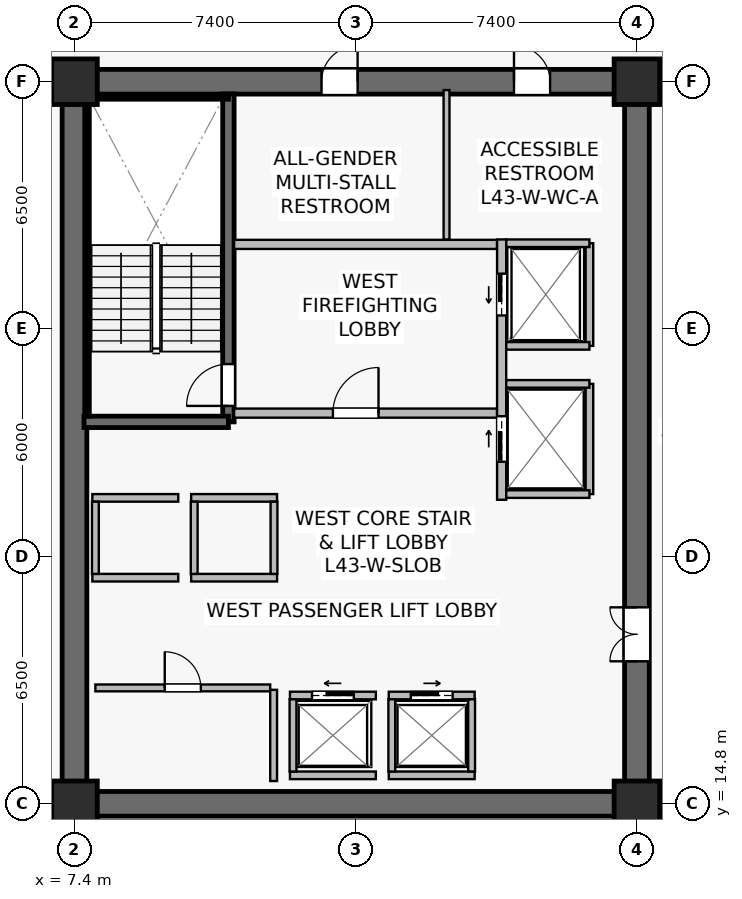
"""IFC4 building model, lengths in metres.
Left out: names, types, materials, properties, quantities, classifications, styles, units other than length and angle.
Written with IfcOpenShell. Run it as: python <this file> out.ifc"""

import sys

from ifc_helpers import new_model, si_unit, direction, frame, frame_2d, origin, origin_2d, place, context, subcontext, project, spatial, rectangle, extrude, source, transform, mapped, element, fill, save


model = new_model("IFC4")
c1 = context("Model", 3, precision=1e-05, world=origin(), true_north=direction((0.0, 1.0)))
c2 = subcontext(c1, "Body", "Model", "MODEL_VIEW")
j1 = project(units=[si_unit("LENGTHUNIT", "METRE"), si_unit("PLANEANGLEUNIT", "RADIAN")], contexts=[c1])
p1 = place(None, origin())
s1 = spatial("IfcSite", under=j1, at=p1, CompositionType="ELEMENT")
p2 = place(p1, origin())
s2 = spatial("IfcBuilding", under=s1, at=p2, CompositionType="ELEMENT")
p3 = place(p2, frame((0.0, 0.0, 178.9)))
s3 = spatial("IfcBuildingStorey", under=s2, at=p3, CompositionType="ELEMENT", Elevation=178.9)
p4 = place(p3, frame((7.075, 14.8, 0.0), z_axis=(0.0, 0.0, 1.0), x_axis=(1.0, 0.0, 0.0)))
e1 = element("IfcWall", 1, at=p4, inside=s3, PredefinedType="SHEAR", context=c2, shape_type="SweptSolid", body=[
    extrude(rectangle(XDim=15.45, YDim=0.65, at=frame_2d((7.725, 0.0))), origin(), (0.0, 0.0, 1.0), 3.79),
])
p5 = place(p3, frame((7.075, 33.8, 0.0), z_axis=(0.0, 0.0, 1.0), x_axis=(1.0, 0.0, 0.0)))
e2 = element("IfcWall", 2, at=p5, inside=s3, PredefinedType="SHEAR", context=c2, shape_type="SweptSolid", body=[
    extrude(rectangle(XDim=15.45, YDim=0.65, at=frame_2d((7.725, 0.0))), origin(), (0.0, 0.0, 1.0), 3.79),
])
p6 = place(p5, frame((6.825, 0.0, 0.0)))
e3 = element("IfcOpeningElement", 3, at=p6, cuts=e2, PredefinedType="OPENING", context=c2, shape_type="SweptSolid", body=[
    extrude(rectangle(XDim=0.95, YDim=2.15, at=frame_2d((0.475, 1.075))), frame((0.0, 0.335, 0.0), z_axis=(0.0, -1.0, 0.0), x_axis=(1.0, 0.0, 0.0)), (0.0, 0.0, 1.0), 0.67),
])
p7 = place(p5, frame((11.89, 0.0, 0.0)))
e4 = element("IfcOpeningElement", 4, at=p7, cuts=e2, PredefinedType="OPENING", context=c2, shape_type="SweptSolid", body=[
    extrude(rectangle(XDim=0.95, YDim=2.15, at=frame_2d((0.475, 1.075))), frame((0.0, 0.335, 0.0), z_axis=(0.0, -1.0, 0.0), x_axis=(1.0, 0.0, 0.0)), (0.0, 0.0, 1.0), 0.67),
])
p8 = place(p3, frame((7.4, 15.125, 0.0), z_axis=(0.0, 0.0, 1.0), x_axis=(0.0, 1.0, 0.0)))
e5 = element("IfcWall", 5, at=p8, inside=s3, PredefinedType="SHEAR", context=c2, shape_type="SweptSolid", body=[
    extrude(rectangle(XDim=18.35, YDim=0.65, at=frame_2d((9.175, 0.0))), origin(), (0.0, 0.0, 1.0), 3.79),
])
p9 = place(p3, frame((22.2, 15.125, 0.0), z_axis=(0.0, 0.0, 1.0), x_axis=(0.0, 1.0, 0.0)))
e6 = element("IfcWall", 6, at=p9, inside=s3, PredefinedType="SHEAR", context=c2, shape_type="SweptSolid", body=[
    extrude(rectangle(XDim=18.35, YDim=0.65, at=frame_2d((9.175, 0.0))), origin(), (0.0, 0.0, 1.0), 3.79),
])
p10 = place(p9, frame((3.425, 0.0, 0.0)))
e7 = element("IfcOpeningElement", 7, at=p10, cuts=e6, PredefinedType="OPENING", context=c2, shape_type="SweptSolid", body=[
    extrude(rectangle(XDim=1.42, YDim=2.2, at=frame_2d((0.71, 1.1))), frame((0.0, 0.335, 0.0), z_axis=(0.0, -1.0, 0.0), x_axis=(1.0, 0.0, 0.0)), (0.0, 0.0, 1.0), 0.67),
])
p11 = place(p3, frame((11.45, 24.85, 0.0), z_axis=(0.0, 0.0, 1.0), x_axis=(0.0, 1.0, 0.0)))
e8 = element("IfcWall", 8, at=p11, inside=s3, PredefinedType="SHEAR", context=c2, shape_type="SweptSolid", body=[
    extrude(rectangle(XDim=8.63, YDim=0.3, at=frame_2d((4.315, 0.0))), origin(), (0.0, 0.0, 1.0), 3.79),
])
p12 = place(p11, frame((0.42, 0.0, 0.0)))
e9 = element("IfcOpeningElement", 9, at=p12, cuts=e8, PredefinedType="OPENING", context=c2, shape_type="SweptSolid", body=[
    extrude(rectangle(XDim=1.1, YDim=2.15, at=frame_2d((0.55, 1.075))), frame((0.0, 0.16, 0.0), z_axis=(0.0, -1.0, 0.0), x_axis=(1.0, 0.0, 0.0)), (0.0, 0.0, 1.0), 0.32),
])
p13 = place(p3, frame((7.65, 24.85, 0.0), z_axis=(0.0, 0.0, 1.0), x_axis=(1.0, 0.0, 0.0)))
e10 = element("IfcWall", 10, at=p13, inside=s3, PredefinedType="SHEAR", context=c2, shape_type="SweptSolid", body=[
    extrude(rectangle(XDim=3.8, YDim=0.3, at=frame_2d((1.9, 0.0))), origin(), (0.0, 0.0, 1.0), 3.79),
])
p14 = place(p3, frame((7.73, 33.4, 0.0), z_axis=(0.0, 0.0, 1.0), x_axis=(1.0, 0.0, 0.0)))
e11 = element("IfcWall", 11, at=p14, inside=s3, PredefinedType="SOLIDWALL", context=c2, shape_type="SweptSolid", body=[
    extrude(rectangle(XDim=3.72, YDim=0.12, at=frame_2d((1.86, 0.0))), origin(), (0.0, 0.0, 1.0), 3.79),
])
p15 = place(p3, frame((7.73, 25.0, 0.0), z_axis=(0.0, 0.0, 1.0), x_axis=(0.0, 1.0, 0.0)))
e12 = element("IfcWall", 12, at=p15, inside=s3, PredefinedType="SOLIDWALL", context=c2, shape_type="SweptSolid", body=[
    extrude(rectangle(XDim=8.32, YDim=0.12, at=frame_2d((4.16, 0.0))), origin(), (0.0, 0.0, 1.0), 3.79),
])
m1 = source(origin(), c2, "Body", "SweptSolid", [
    extrude(rectangle(XDim=1.2, YDim=1.2, at=origin_2d()), origin(), (0.0, 0.0, 1.0), 4.1),
])
for number, where, z_axis, x_axis in (
    (13, (7.4, 14.8, 0.0), (0.0, 0.0, 1.0), (1.0, 0.0, 0.0)),
    (14, (22.2, 14.8, 0.0), (0.0, 0.0, 1.0), (1.0, 0.0, 0.0)),
    (15, (7.4, 33.8, 0.0), (0.0, 0.0, 1.0), (1.0, 0.0, 0.0)),
    (16, (22.2, 33.8, 0.0), (0.0, 0.0, 1.0), (1.0, 0.0, 0.0)),
):
    element("IfcColumn", number, at=place(p3, frame(where, z_axis=z_axis, x_axis=x_axis)), inside=s3, PredefinedType="COLUMN", context=c2, shape_type="MappedRepresentation", body=[
        mapped(m1, transform((0.0, 0.0, 0.0), scale=1.0)),
    ])
p16 = place(p3, frame((11.6, 25.08, 0.0), z_axis=(0.0, 0.0, 1.0), x_axis=(1.0, 0.0, 0.0)))
e17 = element("IfcWall", 17, at=p16, inside=s3, PredefinedType="SOLIDWALL", context=c2, shape_type="SweptSolid", body=[
    extrude(rectangle(XDim=6.92, YDim=0.24, at=frame_2d((3.46, 0.0))), origin(), (0.0, 0.0, 1.0), 3.187),
])
p17 = place(p16, frame((2.6, 0.0, 0.0)))
e18 = element("IfcOpeningElement", 18, at=p17, cuts=e17, PredefinedType="OPENING", context=c2, shape_type="SweptSolid", body=[
    extrude(rectangle(XDim=1.2, YDim=2.16, at=frame_2d((0.6, 1.08))), frame((0.0, 0.13, 0.0), z_axis=(0.0, -1.0, 0.0), x_axis=(1.0, 0.0, 0.0)), (0.0, 0.0, 1.0), 0.26),
])
p18 = place(p3, frame((11.6, 29.52, 0.0), z_axis=(0.0, 0.0, 1.0), x_axis=(1.0, 0.0, 0.0)))
e19 = element("IfcWall", 19, at=p18, inside=s3, PredefinedType="SOLIDWALL", context=c2, shape_type="SweptSolid", body=[
    extrude(rectangle(XDim=6.92, YDim=0.24, at=frame_2d((3.46, 0.0))), origin(), (0.0, 0.0, 1.0), 3.187),
])
p19 = place(p3, frame((18.64, 22.8, 0.0), z_axis=(0.0, 0.0, 1.0), x_axis=(0.0, 1.0, 0.0)))
e20 = element("IfcWall", 20, at=p19, inside=s3, PredefinedType="SOLIDWALL", context=c2, shape_type="SweptSolid", body=[
    extrude(rectangle(XDim=6.85, YDim=0.24, at=frame_2d((3.425, 0.0))), origin(), (0.0, 0.0, 1.0), 2.925),
])
p20 = place(p19, frame((4.85, 0.0, 0.0)))
e21 = element("IfcOpeningElement", 21, at=p20, cuts=e20, PredefinedType="OPENING", context=c2, shape_type="SweptSolid", body=[
    extrude(rectangle(XDim=1.1, YDim=2.22, at=frame_2d((0.55, 1.11))), frame((0.0, 0.13, 0.0), z_axis=(0.0, -1.0, 0.0), x_axis=(1.0, 0.0, 0.0)), (0.0, 0.0, 1.0), 0.26),
])
p21 = place(p19, frame((1.0, 0.0, 0.0)))
e22 = element("IfcOpeningElement", 22, at=p21, cuts=e20, PredefinedType="OPENING", context=c2, shape_type="SweptSolid", body=[
    extrude(rectangle(XDim=1.2, YDim=2.22, at=frame_2d((0.6, 1.11))), frame((0.0, 0.13, 0.0), z_axis=(0.0, -1.0, 0.0), x_axis=(1.0, 0.0, 0.0)), (0.0, 0.0, 1.0), 0.26),
])
p22 = place(p3, frame((13.07, 17.65, 0.0), z_axis=(0.0, 0.0, 1.0), x_axis=(1.0, 0.0, 0.0)))
e23 = element("IfcWall", 23, at=p22, inside=s3, PredefinedType="SOLIDWALL", context=c2, shape_type="SweptSolid", body=[
    extrude(rectangle(XDim=2.26, YDim=0.2, at=frame_2d((1.13, 0.0))), origin(), (0.0, 0.0, 1.0), 3.187),
])
p23 = place(p22, frame((0.58, 0.0, 0.0)))
e24 = element("IfcOpeningElement", 24, at=p23, cuts=e23, PredefinedType="OPENING", context=c2, shape_type="SweptSolid", body=[
    extrude(rectangle(XDim=1.1, YDim=2.22, at=frame_2d((0.55, 1.11))), frame((0.0, 0.11, 0.0), z_axis=(0.0, -1.0, 0.0), x_axis=(1.0, 0.0, 0.0)), (0.0, 0.0, 1.0), 0.22),
])
p24 = place(p3, frame((13.07, 15.55, 0.0), z_axis=(0.0, 0.0, 1.0), x_axis=(1.0, 0.0, 0.0)))
e25 = element("IfcWall", 25, at=p24, inside=s3, PredefinedType="SOLIDWALL", context=c2, shape_type="SweptSolid", body=[
    extrude(rectangle(XDim=2.26, YDim=0.2, at=frame_2d((1.13, 0.0))), origin(), (0.0, 0.0, 1.0), 3.187),
])
p25 = place(p3, frame((13.15, 15.65, 0.0), z_axis=(0.0, 0.0, 1.0), x_axis=(0.0, 1.0, 0.0)))
e26 = element("IfcWall", 26, at=p25, inside=s3, PredefinedType="SOLIDWALL", context=c2, shape_type="SweptSolid", body=[
    extrude(rectangle(XDim=1.9, YDim=0.18, at=frame_2d((0.95, 0.0))), origin(), (0.0, 0.0, 1.0), 3.79),
])
p26 = place(p3, frame((15.67, 17.65, 0.0), z_axis=(0.0, 0.0, 1.0), x_axis=(1.0, 0.0, 0.0)))
e27 = element("IfcWall", 27, at=p26, inside=s3, PredefinedType="SOLIDWALL", context=c2, shape_type="SweptSolid", body=[
    extrude(rectangle(XDim=2.26, YDim=0.2, at=frame_2d((1.13, 0.0))), origin(), (0.0, 0.0, 1.0), 3.79),
])
p27 = place(p26, frame((0.58, 0.0, 0.0)))
e28 = element("IfcOpeningElement", 28, at=p27, cuts=e27, PredefinedType="OPENING", context=c2, shape_type="SweptSolid", body=[
    extrude(rectangle(XDim=1.1, YDim=2.22, at=frame_2d((0.55, 1.11))), frame((0.0, 0.11, 0.0), z_axis=(0.0, -1.0, 0.0), x_axis=(1.0, 0.0, 0.0)), (0.0, 0.0, 1.0), 0.22),
])
p28 = place(p3, frame((15.67, 15.55, 0.0), z_axis=(0.0, 0.0, 1.0), x_axis=(1.0, 0.0, 0.0)))
e29 = element("IfcWall", 29, at=p28, inside=s3, PredefinedType="SOLIDWALL", context=c2, shape_type="SweptSolid", body=[
    extrude(rectangle(XDim=2.26, YDim=0.2, at=frame_2d((1.13, 0.0))), origin(), (0.0, 0.0, 1.0), 3.79),
])
for number, where, z_axis, x_axis in (
    (30, (15.75, 15.65, 0.0), (0.0, 0.0, 1.0), (0.0, 1.0, 0.0)),
    (31, (17.85, 15.65, 0.0), (0.0, 0.0, 1.0), (0.0, 1.0, 0.0)),
):
    element("IfcWall", number, at=place(p3, frame(where, z_axis=z_axis, x_axis=x_axis)), inside=s3, PredefinedType="SOLIDWALL", context=c2, shape_type="SweptSolid", body=[
        extrude(rectangle(XDim=1.9, YDim=0.18, at=frame_2d((0.95, 0.0))), origin(), (0.0, 0.0, 1.0), 3.79),
    ])
for number, where, z_axis, x_axis in (
    (32, (7.87, 20.75, 0.0), (0.0, 0.0, 1.0), (1.0, 0.0, 0.0)),
    (33, (7.87, 22.85, 0.0), (0.0, 0.0, 1.0), (1.0, 0.0, 0.0)),
):
    element("IfcWall", number, at=place(p3, frame(where, z_axis=z_axis, x_axis=x_axis)), inside=s3, PredefinedType="SOLIDWALL", context=c2, shape_type="SweptSolid", body=[
        extrude(rectangle(XDim=2.26, YDim=0.2, at=frame_2d((1.13, 0.0))), origin(), (0.0, 0.0, 1.0), 3.79),
    ])
p29 = place(p3, frame((7.95, 20.85, 0.0), z_axis=(0.0, 0.0, 1.0), x_axis=(0.0, 1.0, 0.0)))
e34 = element("IfcWall", 34, at=p29, inside=s3, PredefinedType="SOLIDWALL", context=c2, shape_type="SweptSolid", body=[
    extrude(rectangle(XDim=1.9, YDim=0.18, at=frame_2d((0.95, 0.0))), origin(), (0.0, 0.0, 1.0), 3.79),
])
for number, where, z_axis, x_axis in (
    (35, (10.47, 20.75, 0.0), (0.0, 0.0, 1.0), (1.0, 0.0, 0.0)),
    (36, (10.47, 22.85, 0.0), (0.0, 0.0, 1.0), (1.0, 0.0, 0.0)),
):
    element("IfcWall", number, at=place(p3, frame(where, z_axis=z_axis, x_axis=x_axis)), inside=s3, PredefinedType="SOLIDWALL", context=c2, shape_type="SweptSolid", body=[
        extrude(rectangle(XDim=2.26, YDim=0.2, at=frame_2d((1.13, 0.0))), origin(), (0.0, 0.0, 1.0), 3.79),
    ])
for number, where, z_axis, x_axis in (
    (37, (10.55, 20.85, 0.0), (0.0, 0.0, 1.0), (0.0, 1.0, 0.0)),
    (38, (12.65, 20.85, 0.0), (0.0, 0.0, 1.0), (0.0, 1.0, 0.0)),
):
    element("IfcWall", number, at=place(p3, frame(where, z_axis=z_axis, x_axis=x_axis)), inside=s3, PredefinedType="SOLIDWALL", context=c2, shape_type="SweptSolid", body=[
        extrude(rectangle(XDim=1.9, YDim=0.18, at=frame_2d((0.95, 0.0))), origin(), (0.0, 0.0, 1.0), 3.79),
    ])
p30 = place(p3, frame((20.95, 26.85, 0.0), z_axis=(0.0, 0.0, 1.0), x_axis=(0.0, 1.0, 0.0)))
e39 = element("IfcWall", 39, at=p30, inside=s3, PredefinedType="SOLIDWALL", context=c2, shape_type="SweptSolid", body=[
    extrude(rectangle(XDim=2.7, YDim=0.2, at=frame_2d((1.35, 0.0))), origin(), (0.0, 0.0, 1.0), 3.79),
])
p31 = place(p3, frame((18.76, 29.55, 0.0), z_axis=(0.0, 0.0, 1.0), x_axis=(1.0, 0.0, 0.0)))
e40 = element("IfcWall", 40, at=p31, inside=s3, PredefinedType="SOLIDWALL", context=c2, shape_type="SweptSolid", body=[
    extrude(rectangle(XDim=2.19, YDim=0.2, at=frame_2d((1.095, 0.0))), origin(), (0.0, 0.0, 1.0), 3.79),
])
p32 = place(p3, frame((18.76, 26.85, 0.0), z_axis=(0.0, 0.0, 1.0), x_axis=(1.0, 0.0, 0.0)))
e41 = element("IfcWall", 41, at=p32, inside=s3, PredefinedType="SOLIDWALL", context=c2, shape_type="SweptSolid", body=[
    extrude(rectangle(XDim=2.19, YDim=0.2, at=frame_2d((1.095, 0.0))), origin(), (0.0, 0.0, 1.0), 3.187),
])
p33 = place(p3, frame((20.95, 22.95, 0.0), z_axis=(0.0, 0.0, 1.0), x_axis=(0.0, 1.0, 0.0)))
e42 = element("IfcWall", 42, at=p33, inside=s3, PredefinedType="SOLIDWALL", context=c2, shape_type="SweptSolid", body=[
    extrude(rectangle(XDim=2.9, YDim=0.2, at=frame_2d((1.45, 0.0))), origin(), (0.0, 0.0, 1.0), 2.925),
])
for number, where, z_axis, x_axis in (
    (43, (18.76, 25.85, 0.0), (0.0, 0.0, 1.0), (1.0, 0.0, 0.0)),
    (44, (18.76, 22.95, 0.0), (0.0, 0.0, 1.0), (1.0, 0.0, 0.0)),
):
    element("IfcWall", number, at=place(p3, frame(where, z_axis=z_axis, x_axis=x_axis)), inside=s3, PredefinedType="SOLIDWALL", context=c2, shape_type="SweptSolid", body=[
        extrude(rectangle(XDim=2.19, YDim=0.2, at=frame_2d((1.095, 0.0))), origin(), (0.0, 0.0, 1.0), 3.79),
    ])
p34 = place(p3, frame((7.95, 17.85, 0.0), z_axis=(0.0, 0.0, 1.0), x_axis=(1.0, 0.0, 0.0)))
e45 = element("IfcWall", 45, at=p34, inside=s3, PredefinedType="SOLIDWALL", context=c2, shape_type="SweptSolid", body=[
    extrude(rectangle(XDim=4.6, YDim=0.18, at=frame_2d((2.3, 0.0))), origin(), (0.0, 0.0, 1.0), 3.79),
])
p35 = place(p34, frame((1.825, 0.0, 0.0)))
e46 = element("IfcOpeningElement", 46, at=p35, cuts=e45, PredefinedType="OPENING", context=c2, shape_type="SweptSolid", body=[
    extrude(rectangle(XDim=0.95, YDim=2.15, at=frame_2d((0.475, 1.075))), frame((0.0, 0.1, 0.0), z_axis=(0.0, -1.0, 0.0), x_axis=(1.0, 0.0, 0.0)), (0.0, 0.0, 1.0), 0.2),
])
p36 = place(p3, frame((12.64, 15.4, 0.0), z_axis=(0.0, 0.0, 1.0), x_axis=(0.0, 1.0, 0.0)))
e47 = element("IfcWall", 47, at=p36, inside=s3, PredefinedType="SOLIDWALL", context=c2, shape_type="SweptSolid", body=[
    extrude(rectangle(XDim=2.4, YDim=0.18, at=frame_2d((1.2, 0.0))), origin(), (0.0, 0.0, 1.0), 3.79),
])
p37 = place(p3, frame((17.19, 29.65, 0.0), z_axis=(0.0, 0.0, 1.0), x_axis=(0.0, 1.0, 0.0)))
e48 = element("IfcWall", 48, at=p37, inside=s3, PredefinedType="PLUMBINGWALL", context=c2, shape_type="SweptSolid", body=[
    extrude(rectangle(XDim=3.93, YDim=0.155, at=frame_2d((1.965, 0.0))), origin(), (0.0, 0.0, 1.0), 3.79),
])
m2 = source(origin(), c2, "Body", "SweptSolid", [
    extrude(rectangle(XDim=1.1, YDim=2.15, at=frame_2d((0.55, 1.075))), frame((0.0, 0.025, 0.0), z_axis=(0.0, -1.0, 0.0), x_axis=(1.0, 0.0, 0.0)), (0.0, 0.0, 1.0), 0.05),
])
p38 = place(p12, origin())
e49 = element("IfcDoor", 49, at=p38, inside=s3, OperationType="SINGLE_SWING_LEFT", PredefinedType="DOOR", context=c2, shape_type="MappedRepresentation", body=[
    mapped(m2, transform((0.0, 0.0, 0.0), scale=1.0)),
])
fill(e9, e49)
m3 = source(origin(), c2, "Body", "SweptSolid", [
    extrude(rectangle(XDim=1.2, YDim=2.16, at=frame_2d((0.6, 1.08))), frame((0.0, 0.025, 0.0), z_axis=(0.0, -1.0, 0.0), x_axis=(1.0, 0.0, 0.0)), (0.0, 0.0, 1.0), 0.05),
])
p39 = place(p17, origin())
e50 = element("IfcDoor", 50, at=p39, inside=s3, OperationType="SINGLE_SWING_RIGHT", PredefinedType="DOOR", context=c2, shape_type="MappedRepresentation", body=[
    mapped(m3, transform((0.0, 0.0, 0.0), scale=1.0)),
])
fill(e18, e50)
m4 = source(origin(), c2, "Body", "SweptSolid", [
    extrude(rectangle(XDim=1.1, YDim=2.22, at=frame_2d((0.55, 1.11))), frame((0.0, 0.025, 0.0), z_axis=(0.0, -1.0, 0.0), x_axis=(1.0, 0.0, 0.0)), (0.0, 0.0, 1.0), 0.05),
])
p40 = place(p23, origin())
e51 = element("IfcDoor", 51, at=p40, inside=s3, OperationType="SLIDING_TO_LEFT", PredefinedType="USERDEFINED", context=c2, shape_type="MappedRepresentation", body=[
    mapped(m4, transform((0.0, 0.0, 0.0), scale=1.0)),
])
fill(e24, e51)
p41 = place(p27, origin())
e52 = element("IfcDoor", 52, at=p41, inside=s3, OperationType="SLIDING_TO_RIGHT", PredefinedType="USERDEFINED", context=c2, shape_type="MappedRepresentation", body=[
    mapped(m4, transform((0.0, 0.0, 0.0), scale=1.0)),
])
fill(e28, e52)
p42 = place(p20, origin())
e53 = element("IfcDoor", 53, at=p42, inside=s3, OperationType="SLIDING_TO_LEFT", PredefinedType="USERDEFINED", context=c2, shape_type="MappedRepresentation", body=[
    mapped(m4, transform((0.0, 0.0, 0.0), scale=1.0)),
])
fill(e21, e53)
m5 = source(origin(), c2, "Body", "SweptSolid", [
    extrude(rectangle(XDim=1.2, YDim=2.22, at=frame_2d((0.6, 1.11))), frame((0.0, 0.025, 0.0), z_axis=(0.0, -1.0, 0.0), x_axis=(1.0, 0.0, 0.0)), (0.0, 0.0, 1.0), 0.05),
])
p43 = place(p21, origin())
e54 = element("IfcDoor", 54, at=p43, inside=s3, OperationType="SLIDING_TO_RIGHT", PredefinedType="USERDEFINED", context=c2, shape_type="MappedRepresentation", body=[
    mapped(m5, transform((0.0, 0.0, 0.0), scale=1.0)),
])
fill(e22, e54)
m6 = source(origin(), c2, "Body", "SweptSolid", [
    extrude(rectangle(XDim=0.95, YDim=2.15, at=frame_2d((0.475, 1.075))), frame((0.0, 0.025, 0.0), z_axis=(0.0, -1.0, 0.0), x_axis=(1.0, 0.0, 0.0)), (0.0, 0.0, 1.0), 0.05),
])
p44 = place(p35, origin())
e55 = element("IfcDoor", 55, at=p44, inside=s3, OperationType="SINGLE_SWING_LEFT", PredefinedType="DOOR", context=c2, shape_type="MappedRepresentation", body=[
    mapped(m6, transform((0.0, 0.0, 0.0), scale=1.0)),
])
fill(e46, e55)
m7 = source(origin(), c2, "Body", "SweptSolid", [
    extrude(rectangle(XDim=1.42, YDim=2.2, at=frame_2d((0.71, 1.1))), frame((0.0, 0.025, 0.0), z_axis=(0.0, -1.0, 0.0), x_axis=(1.0, 0.0, 0.0)), (0.0, 0.0, 1.0), 0.05),
])
p45 = place(p10, origin())
e56 = element("IfcDoor", 56, at=p45, inside=s3, OperationType="DOUBLE_DOOR_SINGLE_SWING", PredefinedType="DOOR", context=c2, shape_type="MappedRepresentation", body=[
    mapped(m7, transform((0.0, 0.0, 0.0), scale=1.0)),
])
fill(e7, e56)
p46 = place(p6, origin())
e57 = element("IfcDoor", 57, at=p46, inside=s3, OperationType="SINGLE_SWING_RIGHT", PredefinedType="DOOR", context=c2, shape_type="MappedRepresentation", body=[
    mapped(m6, transform((0.0, 0.0, 0.0), scale=1.0)),
])
fill(e3, e57)
p47 = place(p7, origin())
e58 = element("IfcDoor", 58, at=p47, inside=s3, OperationType="SINGLE_SWING_LEFT", PredefinedType="DOOR", context=c2, shape_type="MappedRepresentation", body=[
    mapped(m6, transform((0.0, 0.0, 0.0), scale=1.0)),
])
fill(e4, e58)
save(model, sys.argv[1])
